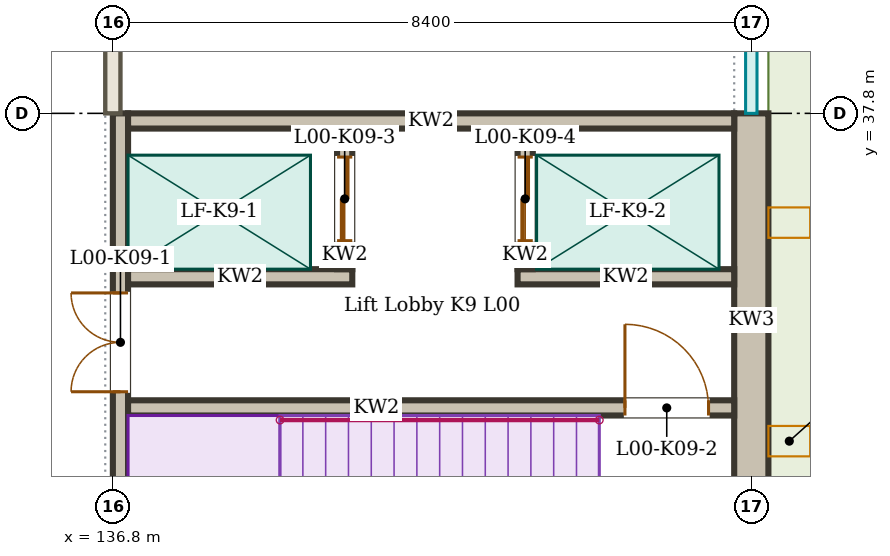
"""IFC4 building model, lengths in metres.
Left out: names, types, materials, properties, quantities, classifications, styles, units other than length and angle.
Written with IfcOpenShell. Run it as: python <this file> out.ifc"""

import sys

from ifc_helpers import new_model, si_unit, direction, frame, frame_2d, origin, place, context, subcontext, project, spatial, rectangle, extrude, element, fill, save


model = new_model("IFC4")
c1 = context("Model", 3, precision=1e-05, world=origin(), true_north=direction((0.0, 1.0)))
c2 = subcontext(c1, "Body", "Model", "MODEL_VIEW")
j1 = project(units=[si_unit("LENGTHUNIT", "METRE"), si_unit("PLANEANGLEUNIT", "RADIAN")], contexts=[c1])
p1 = place(None, origin())
s1 = spatial("IfcSite", under=j1, at=p1, CompositionType="ELEMENT")
p2 = place(p1, origin())
s2 = spatial("IfcBuilding", under=s1, at=p2, CompositionType="ELEMENT")
p3 = place(p2, origin())
s3 = spatial("IfcBuildingStorey", under=s2, at=p3, CompositionType="ELEMENT", Elevation=0.0)
p4 = place(p3, frame((145.36, 37.8, 4.202), z_axis=(0.0, 0.0, 1.0), x_axis=(0.0, 1.0, 0.0)))
e1 = element("IfcWall", 1, at=p4, inside=s3, PredefinedType="SOLIDWALL", context=c2, shape_type="SweptSolid", body=[
    extrude(rectangle(XDim=8.255, YDim=0.13, at=frame_2d((4.127, 0.0))), origin(), (0.0, 0.0, 1.0), 0.298),
])
p5 = place(p3, frame((136.8, 37.8, 0.0), z_axis=(0.0, 0.0, 1.0), x_axis=(0.0, 1.0, 0.0)))
e2 = element("IfcWall", 2, at=p5, inside=s3, PredefinedType="PARTITIONING", context=c2, shape_type="SweptSolid", body=[
    extrude(rectangle(XDim=8.25, YDim=0.2, at=frame_2d((4.125, 0.0))), origin(), (0.0, 0.0, 1.0), 3.8),
])
p6 = place(p3, frame((136.9, 29.625, 0.0), z_axis=(0.0, 0.0, 1.0), x_axis=(0.0, 1.0, 0.0)))
e3 = element("IfcWall", 3, at=p6, inside=s3, PredefinedType="SOLIDWALL", context=c2, shape_type="SweptSolid", body=[
    extrude(rectangle(XDim=8.175, YDim=0.2, at=frame_2d((4.087, 0.0))), origin(), (0.0, 0.0, 1.0), 4.5),
])
p7 = place(p6, frame((4.512, 0.0, 0.0)))
e4 = element("IfcOpeningElement", 4, at=p7, cuts=e3, PredefinedType="OPENING", context=c2, shape_type="SweptSolid", body=[
    extrude(rectangle(XDim=1.3, YDim=2.1, at=frame_2d((0.65, 1.05))), frame((0.0, 0.11, 0.0), z_axis=(0.0, -1.0, 0.0), x_axis=(1.0, 0.0, 0.0)), (0.0, 0.0, 1.0), 0.22),
])
p8 = place(p3, frame((145.2, 29.175, 0.0), z_axis=(0.0, 0.0, 1.0), x_axis=(0.0, 1.0, 0.0)))
e5 = element("IfcWall", 5, at=p8, inside=s3, PredefinedType="SOLIDWALL", context=c2, shape_type="SweptSolid", body=[
    extrude(rectangle(XDim=8.625, YDim=0.45, at=frame_2d((4.312, 0.0))), origin(), (0.0, 0.0, 1.0), 4.5),
])
p9 = place(p8, frame((1.9, 0.0, 0.0)))
e6 = element("IfcOpeningElement", 6, at=p9, cuts=e5, PredefinedType="OPENING", context=c2, shape_type="SweptSolid", body=[
    extrude(rectangle(XDim=1.3, YDim=2.1, at=frame_2d((0.65, 1.05))), frame((0.0, 0.235, 0.0), z_axis=(0.0, -1.0, 0.0), x_axis=(1.0, 0.0, 0.0)), (0.0, 0.0, 1.0), 0.47),
])
p10 = place(p3, frame((137.0, 37.7, 0.0), z_axis=(0.0, 0.0, 1.0), x_axis=(1.0, 0.0, 0.0)))
e7 = element("IfcWall", 7, at=p10, inside=s3, PredefinedType="SOLIDWALL", context=c2, shape_type="SweptSolid", body=[
    extrude(rectangle(XDim=7.975, YDim=0.2, at=frame_2d((3.988, 0.0))), origin(), (0.0, 0.0, 1.0), 4.5),
])
p11 = place(p3, frame((137.0, 33.925, 0.0), z_axis=(0.0, 0.0, 1.0), x_axis=(1.0, 0.0, 0.0)))
e8 = element("IfcWall", 8, at=p11, inside=s3, PredefinedType="SOLIDWALL", context=c2, shape_type="SweptSolid", body=[
    extrude(rectangle(XDim=7.975, YDim=0.2, at=frame_2d((3.988, 0.0))), origin(), (0.0, 0.0, 1.0), 4.5),
])
p12 = place(p11, frame((6.538, 0.0, 0.0)))
e9 = element("IfcOpeningElement", 9, at=p12, cuts=e8, PredefinedType="OPENING", context=c2, shape_type="SweptSolid", body=[
    extrude(rectangle(XDim=1.1, YDim=2.1, at=frame_2d((0.55, 1.05))), frame((0.0, 0.11, 0.0), z_axis=(0.0, -1.0, 0.0), x_axis=(1.0, 0.0, 0.0)), (0.0, 0.0, 1.0), 0.22),
])
p13 = place(p3, frame((137.0, 35.65, 0.0), z_axis=(0.0, 0.0, 1.0), x_axis=(1.0, 0.0, 0.0)))
e10 = element("IfcWall", 10, at=p13, inside=s3, PredefinedType="SOLIDWALL", context=c2, shape_type="SweptSolid", body=[
    extrude(rectangle(XDim=2.95, YDim=0.2, at=frame_2d((1.475, 0.0))), origin(), (0.0, 0.0, 1.0), 4.5),
])
p14 = place(p3, frame((142.125, 35.65, 0.0), z_axis=(0.0, 0.0, 1.0), x_axis=(1.0, 0.0, 0.0)))
e11 = element("IfcWall", 11, at=p14, inside=s3, PredefinedType="SOLIDWALL", context=c2, shape_type="SweptSolid", body=[
    extrude(rectangle(XDim=2.85, YDim=0.2, at=frame_2d((1.425, 0.0))), origin(), (0.0, 0.0, 1.0), 4.5),
])
p15 = place(p3, frame((139.85, 35.75, 0.0), z_axis=(0.0, 0.0, 1.0), x_axis=(0.0, 1.0, 0.0)))
e12 = element("IfcWall", 12, at=p15, inside=s3, PredefinedType="SOLIDWALL", context=c2, shape_type="SweptSolid", body=[
    extrude(rectangle(XDim=1.85, YDim=0.2, at=frame_2d((0.925, 0.0))), origin(), (0.0, 0.0, 1.0), 4.5),
])
p16 = place(p15, frame((0.375, 0.0, 0.0)))
e13 = element("IfcOpeningElement", 13, at=p16, cuts=e12, PredefinedType="OPENING", context=c2, shape_type="SweptSolid", body=[
    extrude(rectangle(XDim=1.1, YDim=2.1, at=frame_2d((0.55, 1.05))), frame((0.0, 0.11, 0.0), z_axis=(0.0, -1.0, 0.0), x_axis=(1.0, 0.0, 0.0)), (0.0, 0.0, 1.0), 0.22),
])
p17 = place(p3, frame((142.225, 35.75, 0.0), z_axis=(0.0, 0.0, 1.0), x_axis=(0.0, 1.0, 0.0)))
e14 = element("IfcWall", 14, at=p17, inside=s3, PredefinedType="SOLIDWALL", context=c2, shape_type="SweptSolid", body=[
    extrude(rectangle(XDim=1.85, YDim=0.2, at=frame_2d((0.925, 0.0))), origin(), (0.0, 0.0, 1.0), 4.5),
])
p18 = place(p17, frame((0.375, 0.0, 0.0)))
e15 = element("IfcOpeningElement", 15, at=p18, cuts=e14, PredefinedType="OPENING", context=c2, shape_type="SweptSolid", body=[
    extrude(rectangle(XDim=1.1, YDim=2.1, at=frame_2d((0.55, 1.05))), frame((0.0, 0.11, 0.0), z_axis=(0.0, -1.0, 0.0), x_axis=(1.0, 0.0, 0.0)), (0.0, 0.0, 1.0), 0.22),
])
p19 = place(p7, origin())
e16 = element("IfcDoor", 16, at=p19, inside=s3, OperationType="DOUBLE_DOOR_DOUBLE_SWING", PredefinedType="DOOR", context=c2, shape_type="SweptSolid", body=[
    extrude(rectangle(XDim=1.3, YDim=2.1, at=frame_2d((0.65, 1.05))), frame((0.0, 0.025, 0.0), z_axis=(0.0, -1.0, 0.0), x_axis=(1.0, 0.0, 0.0)), (0.0, 0.0, 1.0), 0.05),
])
fill(e4, e16)
p20 = place(p12, origin())
e17 = element("IfcDoor", 17, at=p20, inside=s3, OperationType="SINGLE_SWING_LEFT", PredefinedType="DOOR", context=c2, shape_type="SweptSolid", body=[
    extrude(rectangle(XDim=1.1, YDim=2.1, at=frame_2d((0.55, 1.05))), frame((0.0, 0.025, 0.0), z_axis=(0.0, -1.0, 0.0), x_axis=(1.0, 0.0, 0.0)), (0.0, 0.0, 1.0), 0.05),
])
fill(e9, e17)
p21 = place(p16, origin())
e18 = element("IfcDoor", 18, at=p21, inside=s3, OperationType="DOUBLE_DOOR_SLIDING", PredefinedType="DOOR", context=c2, shape_type="SweptSolid", body=[
    extrude(rectangle(XDim=1.1, YDim=2.1, at=frame_2d((0.55, 1.05))), frame((0.0, 0.025, 0.0), z_axis=(0.0, -1.0, 0.0), x_axis=(1.0, 0.0, 0.0)), (0.0, 0.0, 1.0), 0.05),
])
fill(e13, e18)
p22 = place(p18, origin())
e19 = element("IfcDoor", 19, at=p22, inside=s3, OperationType="DOUBLE_DOOR_SLIDING", PredefinedType="DOOR", context=c2, shape_type="SweptSolid", body=[
    extrude(rectangle(XDim=1.1, YDim=2.1, at=frame_2d((0.55, 1.05))), frame((0.0, 0.025, 0.0), z_axis=(0.0, -1.0, 0.0), x_axis=(1.0, 0.0, 0.0)), (0.0, 0.0, 1.0), 0.05),
])
fill(e15, e19)
save(model, sys.argv[1])
